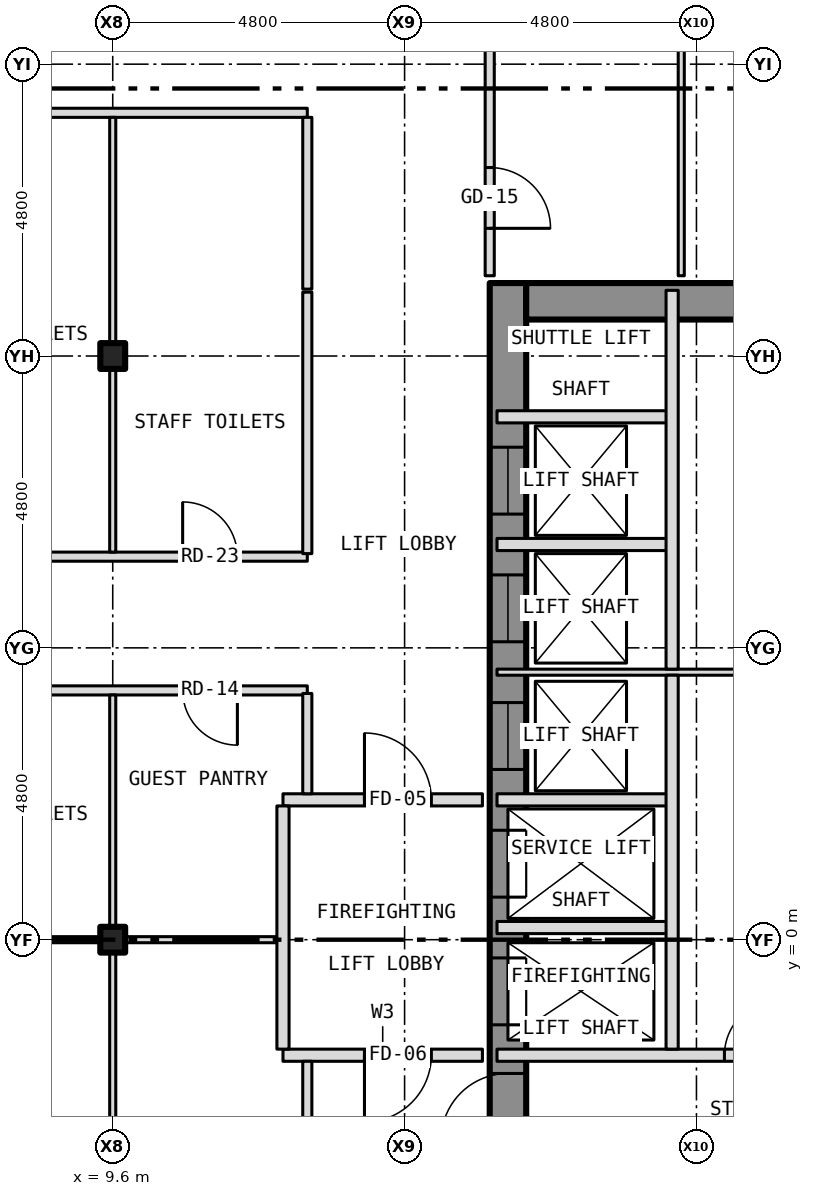
"""IFC4 building model, lengths in metres.
Left out: names, types, materials, properties, quantities, classifications, styles, units other than length and angle.
Written with IfcOpenShell. Run it as: python <this file> out.ifc"""

import sys

from ifc_helpers import new_model, si_unit, direction, frame, frame_2d, origin, origin_2d, place, context, subcontext, project, spatial, rectangle, i_section, extrude, element, fill, save


model = new_model("IFC4")
c1 = context("Model", 3, precision=1e-05, world=origin(), true_north=direction((0.0, 1.0)))
c2 = subcontext(c1, "Body", "Model", "MODEL_VIEW")
j1 = project(units=[si_unit("LENGTHUNIT", "METRE"), si_unit("PLANEANGLEUNIT", "RADIAN")], contexts=[c1])
p1 = place(None, origin())
s1 = spatial("IfcSite", under=j1, at=p1, CompositionType="ELEMENT")
p2 = place(p1, origin())
s2 = spatial("IfcBuilding", under=s1, at=p2, CompositionType="ELEMENT")
p3 = place(p2, frame((0.0, 0.0, 49.5)))
s3 = spatial("IfcBuildingStorey", under=s2, at=p3, CompositionType="ELEMENT", Elevation=49.5)
for number, where, z_axis, x_axis in (
    (1, (9.6, 0.0, -0.15), (0.0, 0.0, 1.0), (1.0, 0.0, 0.0)),
    (2, (9.6, 9.6, -0.15), (0.0, 0.0, 1.0), (1.0, 0.0, 0.0)),
):
    element("IfcColumn", number, at=place(p3, frame(where, z_axis=z_axis, x_axis=x_axis)), inside=s3, PredefinedType="COLUMN", context=c2, shape_type="SweptSolid", body=[
        extrude(i_section(OverallWidth=0.409, OverallDepth=0.424, WebThickness=0.033, FlangeThickness=0.052, at=origin_2d()), origin(), (0.0, 0.0, 1.0), 3.5),
    ])
p4 = place(p3, frame((16.1, -10.8, 0.0), z_axis=(0.0, 0.0, 1.0), x_axis=(0.0, 1.0, 0.0)))
e3 = element("IfcWall", 3, at=p4, inside=s3, PredefinedType="SHEAR", context=c2, shape_type="SweptSolid", body=[
    extrude(rectangle(XDim=21.6, YDim=0.6, at=frame_2d((10.8, 0.0))), origin(), (0.0, 0.0, 1.0), 3.25),
])
p5 = place(p4, frame((9.4, 0.0, 0.0)))
e4 = element("IfcOpeningElement", 4, at=p5, cuts=e3, PredefinedType="OPENING", context=c2, shape_type="SweptSolid", body=[
    extrude(rectangle(XDim=1.1, YDim=2.1, at=frame_2d((0.55, 1.05))), frame((0.0, 0.312, 0.0), z_axis=(0.0, -1.0, 0.0), x_axis=(1.0, 0.0, 0.0)), (0.0, 0.0, 1.0), 0.624),
])
p6 = place(p4, frame((11.5, 0.0, 0.0)))
e5 = element("IfcOpeningElement", 5, at=p6, cuts=e3, PredefinedType="OPENING", context=c2, shape_type="SweptSolid", body=[
    extrude(rectangle(XDim=1.1, YDim=2.1, at=frame_2d((0.55, 1.05))), frame((0.0, 0.312, 0.0), z_axis=(0.0, -1.0, 0.0), x_axis=(1.0, 0.0, 0.0)), (0.0, 0.0, 1.0), 0.624),
])
p7 = place(p4, frame((13.6, 0.0, 0.0)))
e6 = element("IfcOpeningElement", 6, at=p7, cuts=e3, PredefinedType="OPENING", context=c2, shape_type="SweptSolid", body=[
    extrude(rectangle(XDim=1.1, YDim=2.1, at=frame_2d((0.55, 1.05))), frame((0.0, 0.312, 0.0), z_axis=(0.0, -1.0, 0.0), x_axis=(1.0, 0.0, 0.0)), (0.0, 0.0, 1.0), 0.624),
])
p8 = place(p4, frame((15.7, 0.0, 0.0)))
e7 = element("IfcOpeningElement", 7, at=p8, cuts=e3, PredefinedType="OPENING", context=c2, shape_type="SweptSolid", body=[
    extrude(rectangle(XDim=1.1, YDim=2.1, at=frame_2d((0.55, 1.05))), frame((0.0, 0.312, 0.0), z_axis=(0.0, -1.0, 0.0), x_axis=(1.0, 0.0, 0.0)), (0.0, 0.0, 1.0), 0.624),
])
p9 = place(p4, frame((17.8, 0.0, 0.0)))
e8 = element("IfcOpeningElement", 8, at=p9, cuts=e3, PredefinedType="OPENING", context=c2, shape_type="SweptSolid", body=[
    extrude(rectangle(XDim=1.1, YDim=2.1, at=frame_2d((0.55, 1.05))), frame((0.0, 0.312, 0.0), z_axis=(0.0, -1.0, 0.0), x_axis=(1.0, 0.0, 0.0)), (0.0, 0.0, 1.0), 0.624),
])
p10 = place(p4, frame((5.642, 0.0, 0.0)))
e9 = element("IfcOpeningElement", 9, at=p10, cuts=e3, PredefinedType="OPENING", context=c2, shape_type="SweptSolid", body=[
    extrude(rectangle(XDim=1.1, YDim=2.1, at=frame_2d((0.55, 1.05))), frame((0.0, 0.312, 0.0), z_axis=(0.0, -1.0, 0.0), x_axis=(1.0, 0.0, 0.0)), (0.0, 0.0, 1.0), 0.624),
])
p11 = place(p4, frame((7.5, 0.0, 0.0)))
e10 = element("IfcOpeningElement", 10, at=p11, cuts=e3, PredefinedType="OPENING", context=c2, shape_type="SweptSolid", body=[
    extrude(rectangle(XDim=1.1, YDim=2.1, at=frame_2d((0.55, 1.05))), frame((0.0, 0.312, 0.0), z_axis=(0.0, -1.0, 0.0), x_axis=(1.0, 0.0, 0.0)), (0.0, 0.0, 1.0), 0.624),
])
p12 = place(p3, frame((16.4, 10.5, 0.0), z_axis=(0.0, 0.0, 1.0), x_axis=(1.0, 0.0, 0.0)))
e11 = element("IfcWall", 11, at=p12, inside=s3, PredefinedType="SHEAR", context=c2, shape_type="SweptSolid", body=[
    extrude(rectangle(XDim=7.0, YDim=0.6, at=frame_2d((3.5, 0.0))), origin(), (0.0, 0.0, 1.0), 3.25),
])
p13 = place(p3, frame((12.4, -1.9, 0.0), z_axis=(0.0, 0.0, 1.0), x_axis=(1.0, 0.0, 0.0)))
e12 = element("IfcWall", 12, at=p13, inside=s3, PredefinedType="PARTITIONING", context=c2, shape_type="SweptSolid", body=[
    extrude(rectangle(XDim=3.28, YDim=0.2, at=frame_2d((1.64, 0.0))), origin(), (0.0, 0.0, 1.0), 3.35),
])
p14 = place(p13, frame((1.34, 0.0, 0.0)))
e13 = element("IfcOpeningElement", 13, at=p14, cuts=e12, PredefinedType="OPENING", context=c2, shape_type="SweptSolid", body=[
    extrude(rectangle(XDim=1.1, YDim=2.1, at=frame_2d((0.55, 1.05))), frame((0.0, 0.112, 0.0), z_axis=(0.0, -1.0, 0.0), x_axis=(1.0, 0.0, 0.0)), (0.0, 0.0, 1.0), 0.224),
])
p15 = place(p3, frame((15.92, -1.9, 0.0), z_axis=(0.0, 0.0, 1.0), x_axis=(1.0, 0.0, 0.0)))
e14 = element("IfcWall", 14, at=p15, inside=s3, PredefinedType="PARTITIONING", context=c2, shape_type="SweptSolid", body=[
    extrude(rectangle(XDim=7.96, YDim=0.2, at=frame_2d((3.98, 0.0))), origin(), (0.0, 0.0, 1.0), 3.25),
])
p16 = place(p15, frame((3.74, 0.0, 0.0)))
e15 = element("IfcOpeningElement", 15, at=p16, cuts=e14, PredefinedType="OPENING", context=c2, shape_type="SweptSolid", body=[
    extrude(rectangle(XDim=0.9, YDim=2.1, at=frame_2d((0.45, 1.05))), frame((0.0, 0.112, 0.0), z_axis=(0.0, -1.0, 0.0), x_axis=(1.0, 0.0, 0.0)), (0.0, 0.0, 1.0), 0.224),
])
p17 = place(p3, frame((6.3, 0.0, 0.0), z_axis=(0.0, 0.0, 1.0), x_axis=(1.0, 0.0, 0.0)))
e16 = element("IfcWall", 16, at=p17, inside=s3, PredefinedType="PARTITIONING", context=c2, shape_type="SweptSolid", body=[
    extrude(rectangle(XDim=3.096, YDim=0.1, at=frame_2d((1.548, 0.0))), origin(), (0.0, 0.0, 1.0), 2.728),
])
p18 = place(p3, frame((9.396, 0.0, 0.0), z_axis=(0.0, 0.0, 1.0), x_axis=(1.0, 0.0, 0.0)))
e17 = element("IfcWall", 17, at=p18, inside=s3, PredefinedType="PARTITIONING", context=c2, shape_type="SweptSolid", body=[
    extrude(rectangle(XDim=0.408, YDim=0.1, at=frame_2d((0.204, 0.0))), origin(), (0.0, 0.0, 1.0), 3.35),
])
p19 = place(p3, frame((9.804, 0.0, 0.0), z_axis=(0.0, 0.0, 1.0), x_axis=(1.0, 0.0, 0.0)))
e18 = element("IfcWall", 18, at=p19, inside=s3, PredefinedType="PARTITIONING", context=c2, shape_type="SweptSolid", body=[
    extrude(rectangle(XDim=2.596, YDim=0.1, at=frame_2d((1.298, 0.0))), origin(), (0.0, 0.0, 1.0), 2.728),
])
p20 = place(p3, frame((15.92, 0.2, 0.0), z_axis=(0.0, 0.0, 1.0), x_axis=(1.0, 0.0, 0.0)))
e19 = element("IfcWall", 19, at=p20, inside=s3, PredefinedType="PARTITIONING", context=c2, shape_type="SweptSolid", body=[
    extrude(rectangle(XDim=2.88, YDim=0.2, at=frame_2d((1.44, 0.0))), origin(), (0.0, 0.0, 1.0), 3.25),
])
p21 = place(p3, frame((12.4, 2.3, 0.0), z_axis=(0.0, 0.0, 1.0), x_axis=(1.0, 0.0, 0.0)))
e20 = element("IfcWall", 20, at=p21, inside=s3, PredefinedType="PARTITIONING", context=c2, shape_type="SweptSolid", body=[
    extrude(rectangle(XDim=3.28, YDim=0.2, at=frame_2d((1.64, 0.0))), origin(), (0.0, 0.0, 1.0), 3.35),
])
p22 = place(p21, frame((1.34, 0.0, 0.0)))
e21 = element("IfcOpeningElement", 21, at=p22, cuts=e20, PredefinedType="OPENING", context=c2, shape_type="SweptSolid", body=[
    extrude(rectangle(XDim=1.1, YDim=2.1, at=frame_2d((0.55, 1.05))), frame((0.0, 0.112, 0.0), z_axis=(0.0, -1.0, 0.0), x_axis=(1.0, 0.0, 0.0)), (0.0, 0.0, 1.0), 0.224),
])
p23 = place(p3, frame((15.92, 2.3, 0.0), z_axis=(0.0, 0.0, 1.0), x_axis=(1.0, 0.0, 0.0)))
e22 = element("IfcWall", 22, at=p23, inside=s3, PredefinedType="PARTITIONING", context=c2, shape_type="SweptSolid", body=[
    extrude(rectangle(XDim=2.88, YDim=0.2, at=frame_2d((1.44, 0.0))), origin(), (0.0, 0.0, 1.0), 3.25),
])
p24 = place(p3, frame((6.3, 4.1, 0.0), z_axis=(0.0, 0.0, 1.0), x_axis=(1.0, 0.0, 0.0)))
e23 = element("IfcWall", 23, at=p24, inside=s3, PredefinedType="PARTITIONING", context=c2, shape_type="SweptSolid", body=[
    extrude(rectangle(XDim=6.5, YDim=0.15, at=frame_2d((3.25, 0.0))), origin(), (0.0, 0.0, 1.0), 3.35),
])
p25 = place(p24, frame((4.45, 0.0, 0.0)))
e24 = element("IfcOpeningElement", 24, at=p25, cuts=e23, PredefinedType="OPENING", context=c2, shape_type="SweptSolid", body=[
    extrude(rectangle(XDim=0.9, YDim=2.1, at=frame_2d((0.45, 1.05))), frame((0.0, 0.087, 0.0), z_axis=(0.0, -1.0, 0.0), x_axis=(1.0, 0.0, 0.0)), (0.0, 0.0, 1.0), 0.174),
])
p26 = place(p3, frame((15.92, 4.4, 0.0), z_axis=(0.0, 0.0, 1.0), x_axis=(1.0, 0.0, 0.0)))
e25 = element("IfcWall", 25, at=p26, inside=s3, PredefinedType="PARTITIONING", context=c2, shape_type="SweptSolid", body=[
    extrude(rectangle(XDim=7.96, YDim=0.1, at=frame_2d((3.98, 0.0))), origin(), (0.0, 0.0, 1.0), 3.25),
])
p27 = place(p26, frame((5.03, 0.0, 0.0)))
e26 = element("IfcOpeningElement", 26, at=p27, cuts=e25, PredefinedType="OPENING", context=c2, shape_type="SweptSolid", body=[
    extrude(rectangle(XDim=0.9, YDim=2.1, at=frame_2d((0.45, 1.05))), frame((0.0, 0.062, 0.0), z_axis=(0.0, -1.0, 0.0), x_axis=(1.0, 0.0, 0.0)), (0.0, 0.0, 1.0), 0.124),
])
p28 = place(p3, frame((6.3, 6.3, 0.0), z_axis=(0.0, 0.0, 1.0), x_axis=(1.0, 0.0, 0.0)))
e27 = element("IfcWall", 27, at=p28, inside=s3, PredefinedType="PARTITIONING", context=c2, shape_type="SweptSolid", body=[
    extrude(rectangle(XDim=6.5, YDim=0.15, at=frame_2d((3.25, 0.0))), origin(), (0.0, 0.0, 1.0), 3.35),
])
p29 = place(p28, frame((4.45, 0.0, 0.0)))
e28 = element("IfcOpeningElement", 28, at=p29, cuts=e27, PredefinedType="OPENING", context=c2, shape_type="SweptSolid", body=[
    extrude(rectangle(XDim=0.9, YDim=2.1, at=frame_2d((0.45, 1.05))), frame((0.0, 0.087, 0.0), z_axis=(0.0, -1.0, 0.0), x_axis=(1.0, 0.0, 0.0)), (0.0, 0.0, 1.0), 0.174),
])
for number, where, z_axis, x_axis in (
    (29, (15.92, 6.5, 0.0), (0.0, 0.0, 1.0), (1.0, 0.0, 0.0)),
    (30, (15.92, 8.6, 0.0), (0.0, 0.0, 1.0), (1.0, 0.0, 0.0)),
):
    element("IfcWall", number, at=place(p3, frame(where, z_axis=z_axis, x_axis=x_axis)), inside=s3, PredefinedType="PARTITIONING", context=c2, shape_type="SweptSolid", body=[
        extrude(rectangle(XDim=2.88, YDim=0.2, at=frame_2d((1.44, 0.0))), origin(), (0.0, 0.0, 1.0), 3.25),
    ])
p30 = place(p3, frame((6.3, 13.6, 0.0), z_axis=(0.0, 0.0, 1.0), x_axis=(1.0, 0.0, 0.0)))
e31 = element("IfcWall", 31, at=p30, inside=s3, PredefinedType="PARTITIONING", context=c2, shape_type="SweptSolid", body=[
    extrude(rectangle(XDim=6.5, YDim=0.15, at=frame_2d((3.25, 0.0))), origin(), (0.0, 0.0, 1.0), 3.35),
])
p31 = place(p3, frame((9.6, -9.55, 0.0), z_axis=(0.0, 0.0, 1.0), x_axis=(0.0, 1.0, 0.0)))
e32 = element("IfcWall", 32, at=p31, inside=s3, PredefinedType="PARTITIONING", context=c2, shape_type="SweptSolid", body=[
    extrude(rectangle(XDim=9.5, YDim=0.1, at=frame_2d((4.75, 0.0))), origin(), (0.0, 0.0, 1.0), 2.728),
])
p32 = place(p3, frame((9.6, 0.05, 0.0), z_axis=(0.0, 0.0, 1.0), x_axis=(0.0, 1.0, 0.0)))
e33 = element("IfcWall", 33, at=p32, inside=s3, PredefinedType="PARTITIONING", context=c2, shape_type="SweptSolid", body=[
    extrude(rectangle(XDim=3.975, YDim=0.1, at=frame_2d((1.987, 0.0))), origin(), (0.0, 0.0, 1.0), 2.728),
])
p33 = place(p3, frame((9.6, 6.375, 0.0), z_axis=(0.0, 0.0, 1.0), x_axis=(0.0, 1.0, 0.0)))
e34 = element("IfcWall", 34, at=p33, inside=s3, PredefinedType="PARTITIONING", context=c2, shape_type="SweptSolid", body=[
    extrude(rectangle(XDim=3.021, YDim=0.1, at=frame_2d((1.51, 0.0))), origin(), (0.0, 0.0, 1.0), 2.728),
])
p34 = place(p3, frame((9.6, 9.396, 0.0), z_axis=(0.0, 0.0, 1.0), x_axis=(0.0, 1.0, 0.0)))
e35 = element("IfcWall", 35, at=p34, inside=s3, PredefinedType="PARTITIONING", context=c2, shape_type="SweptSolid", body=[
    extrude(rectangle(XDim=0.408, YDim=0.1, at=frame_2d((0.204, 0.0))), origin(), (0.0, 0.0, 1.0), 3.35),
])
p35 = place(p3, frame((9.6, 9.804, 0.0), z_axis=(0.0, 0.0, 1.0), x_axis=(0.0, 1.0, 0.0)))
e36 = element("IfcWall", 36, at=p35, inside=s3, PredefinedType="PARTITIONING", context=c2, shape_type="SweptSolid", body=[
    extrude(rectangle(XDim=3.721, YDim=0.1, at=frame_2d((1.86, 0.0))), origin(), (0.0, 0.0, 1.0), 2.728),
])
p36 = place(p3, frame((12.4, -1.8, 0.0), z_axis=(0.0, 0.0, 1.0), x_axis=(0.0, 1.0, 0.0)))
e37 = element("IfcWall", 37, at=p36, inside=s3, PredefinedType="PARTITIONING", context=c2, shape_type="SweptSolid", body=[
    extrude(rectangle(XDim=4.0, YDim=0.2, at=frame_2d((2.0, 0.0))), origin(), (0.0, 0.0, 1.0), 3.35),
])
p37 = place(p3, frame((12.8, -13.525, 0.0), z_axis=(0.0, 0.0, 1.0), x_axis=(0.0, 1.0, 0.0)))
e38 = element("IfcWall", 38, at=p37, inside=s3, PredefinedType="PARTITIONING", context=c2, shape_type="SweptSolid", body=[
    extrude(rectangle(XDim=11.525, YDim=0.15, at=frame_2d((5.762, 0.0))), origin(), (0.0, 0.0, 1.0), 3.35),
])
p38 = place(p37, frame((7.325, 0.0, 0.0)))
e39 = element("IfcOpeningElement", 39, at=p38, cuts=e38, PredefinedType="OPENING", context=c2, shape_type="SweptSolid", body=[
    extrude(rectangle(XDim=0.9, YDim=2.1, at=frame_2d((0.45, 1.05))), frame((0.0, 0.087, 0.0), z_axis=(0.0, -1.0, 0.0), x_axis=(1.0, 0.0, 0.0)), (0.0, 0.0, 1.0), 0.174),
])
p39 = place(p3, frame((12.8, 2.4, 0.0), z_axis=(0.0, 0.0, 1.0), x_axis=(0.0, 1.0, 0.0)))
e40 = element("IfcWall", 40, at=p39, inside=s3, PredefinedType="PARTITIONING", context=c2, shape_type="SweptSolid", body=[
    extrude(rectangle(XDim=1.65, YDim=0.15, at=frame_2d((0.825, 0.0))), origin(), (0.0, 0.0, 1.0), 3.35),
])
p40 = place(p3, frame((12.8, 6.35, 0.0), z_axis=(0.0, 0.0, 1.0), x_axis=(0.0, 1.0, 0.0)))
e41 = element("IfcWall", 41, at=p40, inside=s3, PredefinedType="PARTITIONING", context=c2, shape_type="SweptSolid", body=[
    extrude(rectangle(XDim=4.3, YDim=0.15, at=frame_2d((2.15, 0.0))), origin(), (0.0, 0.0, 1.0), 3.35),
])
p41 = place(p3, frame((12.8, 10.7, 0.0), z_axis=(0.0, 0.0, 1.0), x_axis=(0.0, 1.0, 0.0)))
e42 = element("IfcWall", 42, at=p41, inside=s3, PredefinedType="PARTITIONING", context=c2, shape_type="SweptSolid", body=[
    extrude(rectangle(XDim=2.825, YDim=0.15, at=frame_2d((1.413, 0.0))), origin(), (0.0, 0.0, 1.0), 3.35),
])
p42 = place(p3, frame((15.8, 10.92, 0.0), z_axis=(0.0, 0.0, 1.0), x_axis=(0.0, 1.0, 0.0)))
e43 = element("IfcWall", 43, at=p42, inside=s3, PredefinedType="PARTITIONING", context=c2, shape_type="SweptSolid", body=[
    extrude(rectangle(XDim=4.805, YDim=0.15, at=frame_2d((2.403, 0.0))), origin(), (0.0, 0.0, 1.0), 3.35),
])
p43 = place(p42, frame((0.78, 0.0, 0.0)))
e44 = element("IfcOpeningElement", 44, at=p43, cuts=e43, PredefinedType="OPENING", context=c2, shape_type="SweptSolid", body=[
    extrude(rectangle(XDim=1.0, YDim=2.1, at=frame_2d((0.5, 1.05))), frame((0.0, 0.087, 0.0), z_axis=(0.0, -1.0, 0.0), x_axis=(1.0, 0.0, 0.0)), (0.0, 0.0, 1.0), 0.174),
])
p44 = place(p3, frame((18.8, -1.8, 0.0), z_axis=(0.0, 0.0, 1.0), x_axis=(0.0, 1.0, 0.0)))
e45 = element("IfcWall", 45, at=p44, inside=s3, PredefinedType="PARTITIONING", context=c2, shape_type="SweptSolid", body=[
    extrude(rectangle(XDim=6.15, YDim=0.2, at=frame_2d((3.075, 0.0))), origin(), (0.0, 0.0, 1.0), 3.25),
])
p45 = place(p3, frame((18.8, 4.45, 0.0), z_axis=(0.0, 0.0, 1.0), x_axis=(0.0, 1.0, 0.0)))
e46 = element("IfcWall", 46, at=p45, inside=s3, PredefinedType="PARTITIONING", context=c2, shape_type="SweptSolid", body=[
    extrude(rectangle(XDim=6.23, YDim=0.2, at=frame_2d((3.115, 0.0))), origin(), (0.0, 0.0, 1.0), 3.25),
])
p46 = place(p3, frame((18.95, 10.92, 0.0), z_axis=(0.0, 0.0, 1.0), x_axis=(0.0, 1.0, 0.0)))
e47 = element("IfcWall", 47, at=p46, inside=s3, PredefinedType="PARTITIONING", context=c2, shape_type="SweptSolid", body=[
    extrude(rectangle(XDim=13.61, YDim=0.1, at=frame_2d((6.805, 0.0))), origin(), (0.0, 0.0, 1.0), 3.35),
])
p47 = place(p46, frame((6.03, 0.0, 0.0)))
e48 = element("IfcOpeningElement", 48, at=p47, cuts=e47, PredefinedType="OPENING", context=c2, shape_type="SweptSolid", body=[
    extrude(rectangle(XDim=0.9, YDim=2.1, at=frame_2d((0.45, 1.05))), frame((0.0, 0.062, 0.0), z_axis=(0.0, -1.0, 0.0), x_axis=(1.0, 0.0, 0.0)), (0.0, 0.0, 1.0), 0.124),
])
p48 = place(p5, origin())
e49 = element("IfcDoor", 49, at=p48, inside=s3, OperationType="SLIDING_TO_LEFT", PredefinedType="DOOR", context=c2, shape_type="SweptSolid", body=[
    extrude(rectangle(XDim=1.1, YDim=2.1, at=frame_2d((0.55, 1.05))), frame((0.0, 0.025, 0.0), z_axis=(0.0, -1.0, 0.0), x_axis=(1.0, 0.0, 0.0)), (0.0, 0.0, 1.0), 0.05),
])
fill(e4, e49)
p49 = place(p6, origin())
e50 = element("IfcDoor", 50, at=p49, inside=s3, OperationType="SLIDING_TO_LEFT", PredefinedType="DOOR", context=c2, shape_type="SweptSolid", body=[
    extrude(rectangle(XDim=1.1, YDim=2.1, at=frame_2d((0.55, 1.05))), frame((0.0, 0.025, 0.0), z_axis=(0.0, -1.0, 0.0), x_axis=(1.0, 0.0, 0.0)), (0.0, 0.0, 1.0), 0.05),
])
fill(e5, e50)
p50 = place(p7, origin())
e51 = element("IfcDoor", 51, at=p50, inside=s3, OperationType="SLIDING_TO_LEFT", PredefinedType="DOOR", context=c2, shape_type="SweptSolid", body=[
    extrude(rectangle(XDim=1.1, YDim=2.1, at=frame_2d((0.55, 1.05))), frame((0.0, 0.025, 0.0), z_axis=(0.0, -1.0, 0.0), x_axis=(1.0, 0.0, 0.0)), (0.0, 0.0, 1.0), 0.05),
])
fill(e6, e51)
p51 = place(p8, origin())
e52 = element("IfcDoor", 52, at=p51, inside=s3, OperationType="SLIDING_TO_LEFT", PredefinedType="DOOR", context=c2, shape_type="SweptSolid", body=[
    extrude(rectangle(XDim=1.1, YDim=2.1, at=frame_2d((0.55, 1.05))), frame((0.0, 0.025, 0.0), z_axis=(0.0, -1.0, 0.0), x_axis=(1.0, 0.0, 0.0)), (0.0, 0.0, 1.0), 0.05),
])
fill(e7, e52)
p52 = place(p9, origin())
e53 = element("IfcDoor", 53, at=p52, inside=s3, OperationType="SLIDING_TO_LEFT", PredefinedType="DOOR", context=c2, shape_type="SweptSolid", body=[
    extrude(rectangle(XDim=1.1, YDim=2.1, at=frame_2d((0.55, 1.05))), frame((0.0, 0.025, 0.0), z_axis=(0.0, -1.0, 0.0), x_axis=(1.0, 0.0, 0.0)), (0.0, 0.0, 1.0), 0.05),
])
fill(e8, e53)
p53 = place(p11, origin())
e54 = element("IfcDoor", 54, at=p53, inside=s3, OperationType="SINGLE_SWING_LEFT", PredefinedType="DOOR", context=c2, shape_type="SweptSolid", body=[
    extrude(rectangle(XDim=1.1, YDim=2.1, at=frame_2d((0.55, 1.05))), frame((0.0, 0.025, 0.0), z_axis=(0.0, -1.0, 0.0), x_axis=(1.0, 0.0, 0.0)), (0.0, 0.0, 1.0), 0.05),
])
fill(e10, e54)
p54 = place(p16, origin())
e55 = element("IfcDoor", 55, at=p54, inside=s3, OperationType="SINGLE_SWING_RIGHT", PredefinedType="DOOR", context=c2, shape_type="SweptSolid", body=[
    extrude(rectangle(XDim=0.9, YDim=2.1, at=frame_2d((0.45, 1.05))), frame((0.0, 0.025, 0.0), z_axis=(0.0, -1.0, 0.0), x_axis=(1.0, 0.0, 0.0)), (0.0, 0.0, 1.0), 0.05),
])
fill(e15, e55)
p55 = place(p22, origin())
e56 = element("IfcDoor", 56, at=p55, inside=s3, OperationType="SINGLE_SWING_LEFT", PredefinedType="DOOR", context=c2, shape_type="SweptSolid", body=[
    extrude(rectangle(XDim=1.1, YDim=2.1, at=frame_2d((0.55, 1.05))), frame((0.0, 0.025, 0.0), z_axis=(0.0, -1.0, 0.0), x_axis=(1.0, 0.0, 0.0)), (0.0, 0.0, 1.0), 0.05),
])
fill(e21, e56)
p56 = place(p14, origin())
e57 = element("IfcDoor", 57, at=p56, inside=s3, OperationType="SINGLE_SWING_LEFT", PredefinedType="DOOR", context=c2, shape_type="SweptSolid", body=[
    extrude(rectangle(XDim=1.1, YDim=2.1, at=frame_2d((0.55, 1.05))), frame((0.0, 0.025, 0.0), z_axis=(0.0, -1.0, 0.0), x_axis=(1.0, 0.0, 0.0)), (0.0, 0.0, 1.0), 0.05),
])
fill(e13, e57)
p57 = place(p43, origin())
e58 = element("IfcDoor", 58, at=p57, inside=s3, OperationType="SINGLE_SWING_LEFT", PredefinedType="DOOR", context=c2, shape_type="SweptSolid", body=[
    extrude(rectangle(XDim=1.0, YDim=2.1, at=frame_2d((0.5, 1.05))), frame((0.0, 0.025, 0.0), z_axis=(0.0, -1.0, 0.0), x_axis=(1.0, 0.0, 0.0)), (0.0, 0.0, 1.0), 0.05),
])
fill(e44, e58)
p58 = place(p25, origin())
e59 = element("IfcDoor", 59, at=p58, inside=s3, OperationType="SINGLE_SWING_RIGHT", PredefinedType="DOOR", context=c2, shape_type="SweptSolid", body=[
    extrude(rectangle(XDim=0.9, YDim=2.1, at=frame_2d((0.45, 1.05))), frame((0.0, 0.025, 0.0), z_axis=(0.0, -1.0, 0.0), x_axis=(1.0, 0.0, 0.0)), (0.0, 0.0, 1.0), 0.05),
])
fill(e24, e59)
p59 = place(p29, origin())
e60 = element("IfcDoor", 60, at=p59, inside=s3, OperationType="SINGLE_SWING_LEFT", PredefinedType="DOOR", context=c2, shape_type="SweptSolid", body=[
    extrude(rectangle(XDim=0.9, YDim=2.1, at=frame_2d((0.45, 1.05))), frame((0.0, 0.025, 0.0), z_axis=(0.0, -1.0, 0.0), x_axis=(1.0, 0.0, 0.0)), (0.0, 0.0, 1.0), 0.05),
])
fill(e28, e60)
save(model, sys.argv[1])
